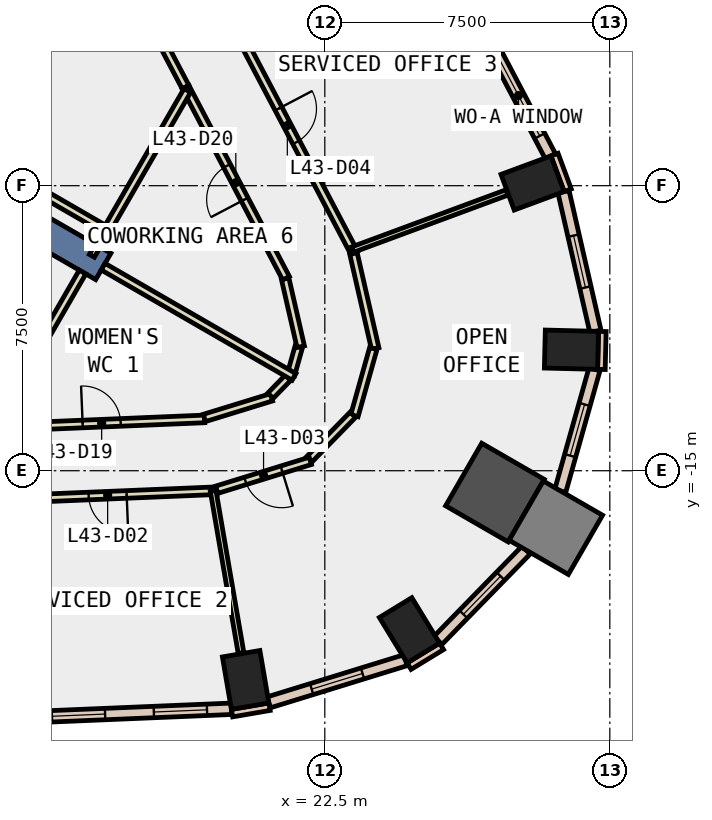
"""IFC4 building model, lengths in metres.
Left out: names, types, materials, properties, quantities, classifications, styles, units other than length and angle.
Written with IfcOpenShell. Run it as: python <this file> out.ifc"""

import sys

from ifc_helpers import new_model, si_unit, direction, frame, frame_2d, origin, origin_2d, place, context, subcontext, project, spatial, rectangle, extrude, element, fill, save


model = new_model("IFC4")
c1 = context("Model", 3, precision=1e-05, world=origin(), true_north=direction((0.0, 1.0)))
c2 = subcontext(c1, "Body", "Model", "MODEL_VIEW")
j1 = project(units=[si_unit("LENGTHUNIT", "METRE"), si_unit("PLANEANGLEUNIT", "RADIAN")], contexts=[c1])
p1 = place(None, origin())
s1 = spatial("IfcSite", under=j1, at=p1, CompositionType="ELEMENT")
p2 = place(p1, origin())
s2 = spatial("IfcBuilding", under=s1, at=p2, CompositionType="ELEMENT")
p3 = place(p2, frame((0.0, 0.0, 194.0)))
s3 = spatial("IfcBuildingStorey", under=s2, at=p3, CompositionType="ELEMENT", Elevation=194.0)
for number, where, z_axis, x_axis in (
    (1, (20.417, -20.505, -0.4), (0.0, 0.0, 1.0), (0.986, 0.169, 0.0)),
    (2, (24.728, -19.199, -0.4), (0.0, 0.0, 1.0), (0.853, 0.521, 0.0)),
):
    element("IfcColumn", number, at=place(p3, frame(where, z_axis=z_axis, x_axis=x_axis)), inside=s3, PredefinedType="COLUMN", context=c2, shape_type="SweptSolid", body=[
        extrude(rectangle(XDim=1.0, YDim=1.4, at=origin_2d()), origin(), (0.0, 0.0, 1.0), 4.2),
    ])
p4 = place(p3, frame((26.977, -15.575, -0.4), z_axis=(0.0, 0.0, 1.0), x_axis=(-0.866025403784, 0.5, 0.0)))
e3 = element("IfcColumn", 3, at=p4, inside=s3, PredefinedType="COLUMN", context=c2, shape_type="SweptSolid", body=[
    extrude(rectangle(XDim=1.9, YDim=1.9, at=origin_2d()), origin(), (0.0, 0.0, 1.0), 4.2),
])
for number, where, z_axis, x_axis in (
    (4, (28.99, -11.816, -0.4), (0.0, 0.0, 1.0), (0.025, 1.0, 0.0)),
    (5, (27.967, -7.429, -0.4), (0.0, 0.0, 1.0), (-0.347, 0.938, 0.0)),
):
    element("IfcColumn", number, at=place(p3, frame(where, z_axis=z_axis, x_axis=x_axis)), inside=s3, PredefinedType="COLUMN", context=c2, shape_type="SweptSolid", body=[
        extrude(rectangle(XDim=1.0, YDim=1.4, at=origin_2d()), origin(), (0.0, 0.0, 1.0), 4.2),
    ])
p5 = place(p3, frame((28.579, -16.5, -0.4), z_axis=(0.0, 0.0, 1.0), x_axis=(-0.866025403784, 0.5, 0.0)))
e6 = element("IfcColumn", 6, at=p5, inside=s3, PredefinedType="COLUMN", context=c2, shape_type="SweptSolid", body=[
    extrude(rectangle(XDim=1.8, YDim=1.8, at=origin_2d()), origin(), (0.0, 0.0, 1.0), 4.2),
])
p6 = place(p3, frame((8.877, -5.125, -0.4), z_axis=(0.0, 0.0, 1.0), x_axis=(0.866017533419, -0.500013631625, 0.0)))
e7 = element("IfcWall", 7, at=p6, inside=s3, PredefinedType="SHEAR", context=c2, shape_type="SweptSolid", body=[
    extrude(rectangle(XDim=9.0, YDim=0.8, at=frame_2d((4.5, 0.0))), origin(), (0.0, 0.0, 1.0), 4.2),
])
for number, where, z_axis, x_axis in (
    (8, (28.891, -7.621, 0.0), (0.0, 0.0, 1.0), (-0.347, 0.938, 0.0)),
    (9, (20.059, -21.378, 0.0), (0.0, 0.0, 1.0), (0.986, 0.169, 0.0)),
):
    element("IfcWall", number, at=place(p3, frame(where, z_axis=z_axis, x_axis=x_axis)), inside=s3, PredefinedType="STANDARD", context=c2, shape_type="SweptSolid", body=[
        extrude(rectangle(XDim=1.0, YDim=0.2, at=frame_2d((0.5, 0.0))), origin(), (0.0, 0.0, 1.0), 3.8),
    ])
p7 = place(p3, frame((24.718, -20.142, 0.0), z_axis=(0.0, 0.0, 1.0), x_axis=(0.853679739553, 0.520798331677, 0.0)))
e10 = element("IfcWall", 10, at=p7, inside=s3, PredefinedType="STANDARD", context=c2, shape_type="SweptSolid", body=[
    extrude(rectangle(XDim=1.0, YDim=0.2, at=frame_2d((0.5, 0.0))), origin(), (0.0, 0.0, 1.0), 3.8),
])
p8 = place(p3, frame((29.778, -12.335, 0.0), z_axis=(0.0, 0.0, 1.0), x_axis=(0.023942303888, 0.999713341956, 0.0)))
e11 = element("IfcWall", 11, at=p8, inside=s3, PredefinedType="STANDARD", context=c2, shape_type="SweptSolid", body=[
    extrude(rectangle(XDim=0.999, YDim=0.2, at=frame_2d((0.5, 0.0))), origin(), (0.0, 0.0, 1.0), 3.8),
])
p9 = place(p3, frame((14.678, -21.488, 0.0), z_axis=(0.0, 0.0, 1.0), x_axis=(0.999127941775, 0.041753514387, 0.0)))
e12 = element("IfcWall", 12, at=p9, inside=s3, PredefinedType="STANDARD", context=c2, shape_type="SweptSolid", body=[
    extrude(rectangle(XDim=5.368, YDim=0.3, at=frame_2d((2.684, 0.0))), origin(), (0.0, 0.0, 1.0), 3.8),
])
p10 = place(p9, frame((0.642, 0.0, 0.9)))
e13 = element("IfcOpeningElement", 13, at=p10, cuts=e12, PredefinedType="OPENING", context=c2, shape_type="SweptSolid", body=[
    extrude(rectangle(XDim=1.4, YDim=2.6, at=frame_2d((0.7, 1.3))), frame((0.0, 0.16, 0.0), z_axis=(0.0, -1.0, 0.0), x_axis=(1.0, 0.0, 0.0)), (0.0, 0.0, 1.0), 0.32),
])
p11 = place(p9, frame((3.326, 0.0, 0.9)))
e14 = element("IfcOpeningElement", 14, at=p11, cuts=e12, PredefinedType="OPENING", context=c2, shape_type="SweptSolid", body=[
    extrude(rectangle(XDim=1.4, YDim=2.6, at=frame_2d((0.7, 1.3))), frame((0.0, 0.16, 0.0), z_axis=(0.0, -1.0, 0.0), x_axis=(1.0, 0.0, 0.0)), (0.0, 0.0, 1.0), 0.32),
])
p12 = place(p3, frame((21.024, -21.095, 0.0), z_axis=(0.0, 0.0, 1.0), x_axis=(0.955692086233, 0.29436819854, 0.0)))
e15 = element("IfcWall", 15, at=p12, inside=s3, PredefinedType="STANDARD", context=c2, shape_type="SweptSolid", body=[
    extrude(rectangle(XDim=3.767, YDim=0.3, at=frame_2d((1.884, 0.0))), origin(), (0.0, 0.0, 1.0), 3.8),
])
p13 = place(p12, frame((1.183, 0.0, 0.9)))
e16 = element("IfcOpeningElement", 16, at=p13, cuts=e15, PredefinedType="OPENING", context=c2, shape_type="SweptSolid", body=[
    extrude(rectangle(XDim=1.4, YDim=2.6, at=frame_2d((0.7, 1.3))), frame((0.0, 0.16, 0.0), z_axis=(0.0, -1.0, 0.0), x_axis=(1.0, 0.0, 0.0)), (0.0, 0.0, 1.0), 0.32),
])
p14 = place(p3, frame((25.476, -19.466, 0.0), z_axis=(0.0, 0.0, 1.0), x_axis=(0.698311919602, 0.71579358962, 0.0)))
e17 = element("IfcWall", 17, at=p14, inside=s3, PredefinedType="STANDARD", context=c2, shape_type="SweptSolid", body=[
    extrude(rectangle(XDim=3.324, YDim=0.3, at=frame_2d((1.662, 0.0))), origin(), (0.0, 0.0, 1.0), 3.8),
])
p15 = place(p14, frame((0.962, 0.0, 0.9)))
e18 = element("IfcOpeningElement", 18, at=p15, cuts=e17, PredefinedType="OPENING", context=c2, shape_type="SweptSolid", body=[
    extrude(rectangle(XDim=1.4, YDim=2.6, at=frame_2d((0.7, 1.3))), frame((0.0, 0.16, 0.0), z_axis=(0.0, -1.0, 0.0), x_axis=(1.0, 0.0, 0.0)), (0.0, 0.0, 1.0), 0.32),
])
p16 = place(p3, frame((28.696, -15.529, 0.0), z_axis=(0.0, 0.0, 1.0), x_axis=(0.270798765166, 0.962635979374, 0.0)))
e19 = element("IfcWall", 19, at=p16, inside=s3, PredefinedType="STANDARD", context=c2, shape_type="SweptSolid", body=[
    extrude(rectangle(XDim=3.323, YDim=0.3, at=frame_2d((1.662, 0.0))), origin(), (0.0, 0.0, 1.0), 3.8),
])
p17 = place(p16, frame((0.962, 0.0, 0.9)))
e20 = element("IfcOpeningElement", 20, at=p17, cuts=e19, PredefinedType="OPENING", context=c2, shape_type="SweptSolid", body=[
    extrude(rectangle(XDim=1.4, YDim=2.6, at=frame_2d((0.7, 1.3))), frame((0.0, 0.16, 0.0), z_axis=(0.0, -1.0, 0.0), x_axis=(1.0, 0.0, 0.0)), (0.0, 0.0, 1.0), 0.32),
])
p18 = place(p3, frame((29.621, -11.332, 0.0), z_axis=(0.0, 0.0, 1.0), x_axis=(-0.223013094864, 0.974815448954, 0.0)))
e21 = element("IfcWall", 21, at=p18, inside=s3, PredefinedType="STANDARD", context=c2, shape_type="SweptSolid", body=[
    extrude(rectangle(XDim=3.767, YDim=0.3, at=frame_2d((1.884, 0.0))), origin(), (0.0, 0.0, 1.0), 3.8),
])
p19 = place(p18, frame((1.183, 0.0, 0.9)))
e22 = element("IfcOpeningElement", 22, at=p19, cuts=e21, PredefinedType="OPENING", context=c2, shape_type="SweptSolid", body=[
    extrude(rectangle(XDim=1.4, YDim=2.6, at=frame_2d((0.7, 1.3))), frame((0.0, 0.16, 0.0), z_axis=(0.0, -1.0, 0.0), x_axis=(1.0, 0.0, 0.0)), (0.0, 0.0, 1.0), 0.32),
])
p20 = place(p3, frame((28.435, -6.724, 0.0), z_axis=(0.0, 0.0, 1.0), x_axis=(-0.465478369088, 0.885059256723, 0.0)))
e23 = element("IfcWall", 23, at=p20, inside=s3, PredefinedType="STANDARD", context=c2, shape_type="SweptSolid", body=[
    extrude(rectangle(XDim=7.208, YDim=0.3, at=frame_2d((3.604, 0.0))), origin(), (0.0, 0.0, 1.0), 3.8),
])
p21 = place(p20, frame((0.602, 0.0, 0.9)))
e24 = element("IfcOpeningElement", 24, at=p21, cuts=e23, PredefinedType="OPENING", context=c2, shape_type="SweptSolid", body=[
    extrude(rectangle(XDim=2.4, YDim=2.6, at=frame_2d((1.2, 1.3))), frame((0.0, 0.16, 0.0), z_axis=(0.0, -1.0, 0.0), x_axis=(1.0, 0.0, 0.0)), (0.0, 0.0, 1.0), 0.32),
])
p22 = place(p20, frame((4.206, 0.0, 0.9)))
e25 = element("IfcOpeningElement", 25, at=p22, cuts=e23, PredefinedType="OPENING", context=c2, shape_type="SweptSolid", body=[
    extrude(rectangle(XDim=2.4, YDim=2.6, at=frame_2d((1.2, 1.3))), frame((0.0, 0.16, 0.0), z_axis=(0.0, -1.0, 0.0), x_axis=(1.0, 0.0, 0.0)), (0.0, 0.0, 1.0), 0.32),
])
p23 = place(p3, frame((18.836, -4.906, 0.0), z_axis=(0.0, 0.0, 1.0), x_axis=(-0.465843561357, 0.884867095299, 0.0)))
e26 = element("IfcWall", 26, at=p23, inside=s3, PredefinedType="PARTITIONING", context=c2, shape_type="SweptSolid", body=[
    extrude(rectangle(XDim=1.554, YDim=0.2, at=frame_2d((0.777, 0.0))), origin(), (0.0, 0.0, 1.0), 3.8),
])
p24 = place(p3, frame((13.919, -13.863, 0.0), z_axis=(0.0, 0.0, 1.0), x_axis=(0.999130261307, 0.041697972867, 0.0)))
e27 = element("IfcWall", 27, at=p24, inside=s3, PredefinedType="PARTITIONING", context=c2, shape_type="SweptSolid", body=[
    extrude(rectangle(XDim=5.422, YDim=0.2, at=frame_2d((2.711, 0.0))), origin(), (0.0, 0.0, 1.0), 3.8),
])
p25 = place(p24, frame((2.211, 0.0, 0.0)))
e28 = element("IfcOpeningElement", 28, at=p25, cuts=e27, PredefinedType="OPENING", context=c2, shape_type="SweptSolid", body=[
    extrude(rectangle(XDim=1.0, YDim=2.1, at=frame_2d((0.5, 1.05))), frame((0.0, 0.11, 0.0), z_axis=(0.0, -1.0, 0.0), x_axis=(1.0, 0.0, 0.0)), (0.0, 0.0, 1.0), 0.22),
])
p26 = place(p3, frame((19.332, -13.611, 0.0), z_axis=(0.0, 0.0, 1.0), x_axis=(0.955790442908, 0.294048685161, 0.0)))
e29 = element("IfcWall", 29, at=p26, inside=s3, PredefinedType="PARTITIONING", context=c2, shape_type="SweptSolid", body=[
    extrude(rectangle(XDim=1.846, YDim=0.2, at=frame_2d((0.923, 0.0))), origin(), (0.0, 0.0, 1.0), 3.8),
])
p27 = place(p3, frame((21.072, -13.026, 0.0), z_axis=(0.0, 0.0, 1.0), x_axis=(0.697252405765, 0.716825698936, 0.0)))
e30 = element("IfcWall", 30, at=p27, inside=s3, PredefinedType="PARTITIONING", context=c2, shape_type="SweptSolid", body=[
    extrude(rectangle(XDim=0.661, YDim=0.2, at=frame_2d((0.331, 0.0))), origin(), (0.0, 0.0, 1.0), 3.8),
])
p28 = place(p3, frame((21.608, -12.476, 0.0), z_axis=(0.0, 0.0, 1.0), x_axis=(0.270277025631, 0.962782597171, 0.0)))
e31 = element("IfcWall", 31, at=p28, inside=s3, PredefinedType="PARTITIONING", context=c2, shape_type="SweptSolid", body=[
    extrude(rectangle(XDim=0.77, YDim=0.2, at=frame_2d((0.385, 0.0))), origin(), (0.0, 0.0, 1.0), 3.8),
])
p29 = place(p3, frame((21.866, -11.737, 0.0), z_axis=(0.0, 0.0, 1.0), x_axis=(-0.222871656966, 0.974847795567, 0.0)))
e32 = element("IfcWall", 32, at=p29, inside=s3, PredefinedType="PARTITIONING", context=c2, shape_type="SweptSolid", body=[
    extrude(rectangle(XDim=1.839, YDim=0.2, at=frame_2d((0.919, 0.0))), origin(), (0.0, 0.0, 1.0), 3.8),
])
p30 = place(p3, frame((21.48, -9.935, 0.0), z_axis=(0.0, 0.0, 1.0), x_axis=(-0.465356775138, 0.885123195851, 0.0)))
e33 = element("IfcWall", 33, at=p30, inside=s3, PredefinedType="PARTITIONING", context=c2, shape_type="SweptSolid", body=[
    extrude(rectangle(XDim=5.682, YDim=0.2, at=frame_2d((2.841, 0.0))), origin(), (0.0, 0.0, 1.0), 3.8),
])
p31 = place(p30, frame((2.341, 0.0, 0.0)))
e34 = element("IfcOpeningElement", 34, at=p31, cuts=e33, PredefinedType="OPENING", context=c2, shape_type="SweptSolid", body=[
    extrude(rectangle(XDim=1.0, YDim=2.1, at=frame_2d((0.5, 1.05))), frame((0.0, 0.11, 0.0), z_axis=(0.0, -1.0, 0.0), x_axis=(1.0, 0.0, 0.0)), (0.0, 0.0, 1.0), 0.22),
])
p32 = place(p3, frame((19.661, -15.525, 0.0), z_axis=(0.0, 0.0, 1.0), x_axis=(-0.999127706659, -0.041759140148, 0.0)))
e35 = element("IfcWall", 35, at=p32, inside=s3, PredefinedType="PARTITIONING", context=c2, shape_type="SweptSolid", body=[
    extrude(rectangle(XDim=5.607, YDim=0.2, at=frame_2d((2.803, 0.0))), origin(), (0.0, 0.0, 1.0), 3.8),
])
p33 = place(p32, frame((2.378, 0.0, 0.0)))
e36 = element("IfcOpeningElement", 36, at=p33, cuts=e35, PredefinedType="OPENING", context=c2, shape_type="SweptSolid", body=[
    extrude(rectangle(XDim=1.0, YDim=2.1, at=frame_2d((0.5, 1.05))), frame((0.0, 0.11, 0.0), z_axis=(0.0, -1.0, 0.0), x_axis=(1.0, 0.0, 0.0)), (0.0, 0.0, 1.0), 0.22),
])
p34 = place(p3, frame((23.253, -9.279, 0.0), z_axis=(0.0, 0.0, 1.0), x_axis=(0.222909903746, -0.974839050722, 0.0)))
e37 = element("IfcWall", 37, at=p34, inside=s3, PredefinedType="PARTITIONING", context=c2, shape_type="SweptSolid", body=[
    extrude(rectangle(XDim=2.571, YDim=0.2, at=frame_2d((1.285, 0.0))), origin(), (0.0, 0.0, 1.0), 3.8),
])
p35 = place(p3, frame((23.776, -11.784, 0.0), z_axis=(0.0, 0.0, 1.0), x_axis=(-0.270522287318, -0.962713712411, 0.0)))
e38 = element("IfcWall", 38, at=p35, inside=s3, PredefinedType="PARTITIONING", context=c2, shape_type="SweptSolid", body=[
    extrude(rectangle(XDim=1.836, YDim=0.2, at=frame_2d((0.918, 0.0))), origin(), (0.0, 0.0, 1.0), 3.8),
])
p36 = place(p3, frame((23.236, -13.528, 0.0), z_axis=(0.0, 0.0, 1.0), x_axis=(-0.698551276451, -0.715560000397, 0.0)))
e39 = element("IfcWall", 39, at=p36, inside=s3, PredefinedType="PARTITIONING", context=c2, shape_type="SweptSolid", body=[
    extrude(rectangle(XDim=1.636, YDim=0.2, at=frame_2d((0.818, 0.0))), origin(), (0.0, 0.0, 1.0), 3.8),
])
p37 = place(p3, frame((22.119, -14.741, 0.0), z_axis=(0.0, 0.0, 1.0), x_axis=(-0.955612889251, -0.294625195625, 0.0)))
e40 = element("IfcWall", 40, at=p37, inside=s3, PredefinedType="PARTITIONING", context=c2, shape_type="SweptSolid", body=[
    extrude(rectangle(XDim=2.576, YDim=0.2, at=frame_2d((1.288, 0.0))), origin(), (0.0, 0.0, 1.0), 3.8),
])
p38 = place(p37, frame((0.788, 0.0, 0.0)))
e41 = element("IfcOpeningElement", 41, at=p38, cuts=e40, PredefinedType="OPENING", context=c2, shape_type="SweptSolid", body=[
    extrude(rectangle(XDim=1.0, YDim=2.1, at=frame_2d((0.5, 1.05))), frame((0.0, 0.11, 0.0), z_axis=(0.0, -1.0, 0.0), x_axis=(1.0, 0.0, 0.0)), (0.0, 0.0, 1.0), 0.22),
])
p39 = place(p3, frame((19.75, -2.563, 0.0), z_axis=(0.0, 0.0, 1.0), x_axis=(0.465444987791, -0.885076812113, 0.0)))
e42 = element("IfcWall", 42, at=p39, inside=s3, PredefinedType="PARTITIONING", context=c2, shape_type="SweptSolid", body=[
    extrude(rectangle(XDim=7.578, YDim=0.2, at=frame_2d((3.789, 0.0))), origin(), (0.0, 0.0, 1.0), 3.8),
])
p40 = place(p39, frame((3.289, 0.0, 0.0)))
e43 = element("IfcOpeningElement", 43, at=p40, cuts=e42, PredefinedType="OPENING", context=c2, shape_type="SweptSolid", body=[
    extrude(rectangle(XDim=1.0, YDim=2.1, at=frame_2d((0.5, 1.05))), frame((0.0, 0.11, 0.0), z_axis=(0.0, -1.0, 0.0), x_axis=(1.0, 0.0, 0.0)), (0.0, 0.0, 1.0), 0.22),
])
p41 = place(p3, frame((9.853, -4.684, 0.0), z_axis=(0.0, 0.0, 1.0), x_axis=(0.865999791918, -0.500044358431, 0.0)))
e44 = element("IfcWall", 44, at=p41, inside=s3, PredefinedType="PARTITIONING", context=c2, shape_type="SweptSolid", body=[
    extrude(rectangle(XDim=8.075, YDim=0.2, at=frame_2d((4.038, 0.0))), origin(), (0.0, 0.0, 1.0), 3.8),
])
p42 = place(p3, frame((16.125, -9.771, 0.0), z_axis=(0.0, 0.0, 1.0), x_axis=(-0.500030759312, -0.866007644159, 0.0)))
e45 = element("IfcWall", 45, at=p42, inside=s3, PredefinedType="PARTITIONING", context=c2, shape_type="SweptSolid", body=[
    extrude(rectangle(XDim=4.73, YDim=0.2, at=frame_2d((2.365, 0.0))), origin(), (0.0, 0.0, 1.0), 3.8),
])
p43 = place(p3, frame((16.71, -8.758, 0.0), z_axis=(0.0, 0.0, 1.0), x_axis=(-0.500013496215, -0.866017611601, 0.0)))
e46 = element("IfcWall", 46, at=p43, inside=s3, PredefinedType="PARTITIONING", context=c2, shape_type="SweptSolid", body=[
    extrude(rectangle(XDim=0.678, YDim=0.15, at=frame_2d((0.339, 0.0))), origin(), (0.0, 0.0, 1.0), 3.8),
])
p44 = place(p3, frame((18.882, -4.995, 0.0), z_axis=(0.0, 0.0, 1.0), x_axis=(-0.499895813511, -0.866085547527, 0.0)))
e47 = element("IfcWall", 47, at=p44, inside=s3, PredefinedType="PARTITIONING", context=c2, shape_type="SweptSolid", body=[
    extrude(rectangle(XDim=4.145, YDim=0.2, at=frame_2d((2.073, 0.0))), origin(), (0.0, 0.0, 1.0), 3.8),
])
p45 = place(p3, frame((16.667, -9.631, 0.0), z_axis=(0.0, 0.0, 1.0), x_axis=(0.866032775405, -0.499987231761, 0.0)))
e48 = element("IfcWall", 48, at=p45, inside=s3, PredefinedType="PARTITIONING", context=c2, shape_type="SweptSolid", body=[
    extrude(rectangle(XDim=5.8, YDim=0.2, at=frame_2d((2.9, 0.0))), origin(), (0.0, 0.0, 1.0), 3.8),
])
p46 = place(p3, frame((19.561, -15.529, 0.0), z_axis=(0.0, 0.0, 1.0), x_axis=(0.169546150064, -0.98552224886, 0.0)))
e49 = element("IfcWall", 49, at=p46, inside=s3, PredefinedType="PARTITIONING", context=c2, shape_type="SweptSolid", body=[
    extrude(rectangle(XDim=4.329, YDim=0.15, at=frame_2d((2.164, 0.0))), origin(), (0.0, 0.0, 1.0), 3.8),
])
p47 = place(p3, frame((23.231, -9.182, 0.0), z_axis=(0.0, 0.0, 1.0), x_axis=(0.937835784628, 0.34707930084, 0.0)))
e50 = element("IfcWall", 50, at=p47, inside=s3, PredefinedType="PARTITIONING", context=c2, shape_type="SweptSolid", body=[
    extrude(rectangle(XDim=4.33, YDim=0.15, at=frame_2d((2.165, 0.0))), origin(), (0.0, 0.0, 1.0), 3.8),
])
p48 = place(p10, origin())
e51 = element("IfcWindow", 51, at=p48, inside=s3, PartitioningType="SINGLE_PANEL", PredefinedType="WINDOW", context=c2, shape_type="SweptSolid", body=[
    extrude(rectangle(XDim=1.4, YDim=2.6, at=frame_2d((0.7, 1.3))), frame((0.0, 0.03, 0.0), z_axis=(0.0, -1.0, 0.0), x_axis=(1.0, 0.0, 0.0)), (0.0, 0.0, 1.0), 0.06),
])
fill(e13, e51)
p49 = place(p11, origin())
e52 = element("IfcWindow", 52, at=p49, inside=s3, PartitioningType="SINGLE_PANEL", PredefinedType="WINDOW", context=c2, shape_type="SweptSolid", body=[
    extrude(rectangle(XDim=1.4, YDim=2.6, at=frame_2d((0.7, 1.3))), frame((0.0, 0.03, 0.0), z_axis=(0.0, -1.0, 0.0), x_axis=(1.0, 0.0, 0.0)), (0.0, 0.0, 1.0), 0.06),
])
fill(e14, e52)
p50 = place(p13, origin())
e53 = element("IfcWindow", 53, at=p50, inside=s3, PartitioningType="SINGLE_PANEL", PredefinedType="WINDOW", context=c2, shape_type="SweptSolid", body=[
    extrude(rectangle(XDim=1.4, YDim=2.6, at=frame_2d((0.7, 1.3))), frame((0.0, 0.03, 0.0), z_axis=(0.0, -1.0, 0.0), x_axis=(1.0, 0.0, 0.0)), (0.0, 0.0, 1.0), 0.06),
])
fill(e16, e53)
p51 = place(p15, origin())
e54 = element("IfcWindow", 54, at=p51, inside=s3, PartitioningType="SINGLE_PANEL", PredefinedType="WINDOW", context=c2, shape_type="SweptSolid", body=[
    extrude(rectangle(XDim=1.4, YDim=2.6, at=frame_2d((0.7, 1.3))), frame((0.0, 0.03, 0.0), z_axis=(0.0, -1.0, 0.0), x_axis=(1.0, 0.0, 0.0)), (0.0, 0.0, 1.0), 0.06),
])
fill(e18, e54)
p52 = place(p17, origin())
e55 = element("IfcWindow", 55, at=p52, inside=s3, PartitioningType="SINGLE_PANEL", PredefinedType="WINDOW", context=c2, shape_type="SweptSolid", body=[
    extrude(rectangle(XDim=1.4, YDim=2.6, at=frame_2d((0.7, 1.3))), frame((0.0, 0.03, 0.0), z_axis=(0.0, -1.0, 0.0), x_axis=(1.0, 0.0, 0.0)), (0.0, 0.0, 1.0), 0.06),
])
fill(e20, e55)
p53 = place(p19, origin())
e56 = element("IfcWindow", 56, at=p53, inside=s3, PartitioningType="SINGLE_PANEL", PredefinedType="WINDOW", context=c2, shape_type="SweptSolid", body=[
    extrude(rectangle(XDim=1.4, YDim=2.6, at=frame_2d((0.7, 1.3))), frame((0.0, 0.03, 0.0), z_axis=(0.0, -1.0, 0.0), x_axis=(1.0, 0.0, 0.0)), (0.0, 0.0, 1.0), 0.06),
])
fill(e22, e56)
p54 = place(p21, origin())
e57 = element("IfcWindow", 57, at=p54, inside=s3, PartitioningType="SINGLE_PANEL", PredefinedType="WINDOW", context=c2, shape_type="SweptSolid", body=[
    extrude(rectangle(XDim=2.4, YDim=2.6, at=frame_2d((1.2, 1.3))), frame((0.0, 0.03, 0.0), z_axis=(0.0, -1.0, 0.0), x_axis=(1.0, 0.0, 0.0)), (0.0, 0.0, 1.0), 0.06),
])
fill(e24, e57)
p55 = place(p33, origin())
e58 = element("IfcDoor", 58, at=p55, inside=s3, OperationType="SINGLE_SWING_LEFT", PredefinedType="DOOR", context=c2, shape_type="SweptSolid", body=[
    extrude(rectangle(XDim=1.0, YDim=2.1, at=frame_2d((0.5, 1.05))), frame((0.0, 0.025, 0.0), z_axis=(0.0, -1.0, 0.0), x_axis=(1.0, 0.0, 0.0)), (0.0, 0.0, 1.0), 0.05),
])
fill(e36, e58)
p56 = place(p38, origin())
e59 = element("IfcDoor", 59, at=p56, inside=s3, OperationType="SINGLE_SWING_LEFT", PredefinedType="DOOR", context=c2, shape_type="SweptSolid", body=[
    extrude(rectangle(XDim=1.0, YDim=2.1, at=frame_2d((0.5, 1.05))), frame((0.0, 0.025, 0.0), z_axis=(0.0, -1.0, 0.0), x_axis=(1.0, 0.0, 0.0)), (0.0, 0.0, 1.0), 0.05),
])
fill(e41, e59)
p57 = place(p40, origin())
e60 = element("IfcDoor", 60, at=p57, inside=s3, OperationType="SINGLE_SWING_LEFT", PredefinedType="DOOR", context=c2, shape_type="SweptSolid", body=[
    extrude(rectangle(XDim=1.0, YDim=2.1, at=frame_2d((0.5, 1.05))), frame((0.0, 0.025, 0.0), z_axis=(0.0, -1.0, 0.0), x_axis=(1.0, 0.0, 0.0)), (0.0, 0.0, 1.0), 0.05),
])
fill(e43, e60)
p58 = place(p25, origin())
e61 = element("IfcDoor", 61, at=p58, inside=s3, OperationType="SINGLE_SWING_LEFT", PredefinedType="DOOR", context=c2, shape_type="SweptSolid", body=[
    extrude(rectangle(XDim=1.0, YDim=2.1, at=frame_2d((0.5, 1.05))), frame((0.0, 0.025, 0.0), z_axis=(0.0, -1.0, 0.0), x_axis=(1.0, 0.0, 0.0)), (0.0, 0.0, 1.0), 0.05),
])
fill(e28, e61)
p59 = place(p31, origin())
e62 = element("IfcDoor", 62, at=p59, inside=s3, OperationType="SINGLE_SWING_LEFT", PredefinedType="DOOR", context=c2, shape_type="SweptSolid", body=[
    extrude(rectangle(XDim=1.0, YDim=2.1, at=frame_2d((0.5, 1.05))), frame((0.0, 0.025, 0.0), z_axis=(0.0, -1.0, 0.0), x_axis=(1.0, 0.0, 0.0)), (0.0, 0.0, 1.0), 0.05),
])
fill(e34, e62)
save(model, sys.argv[1])
